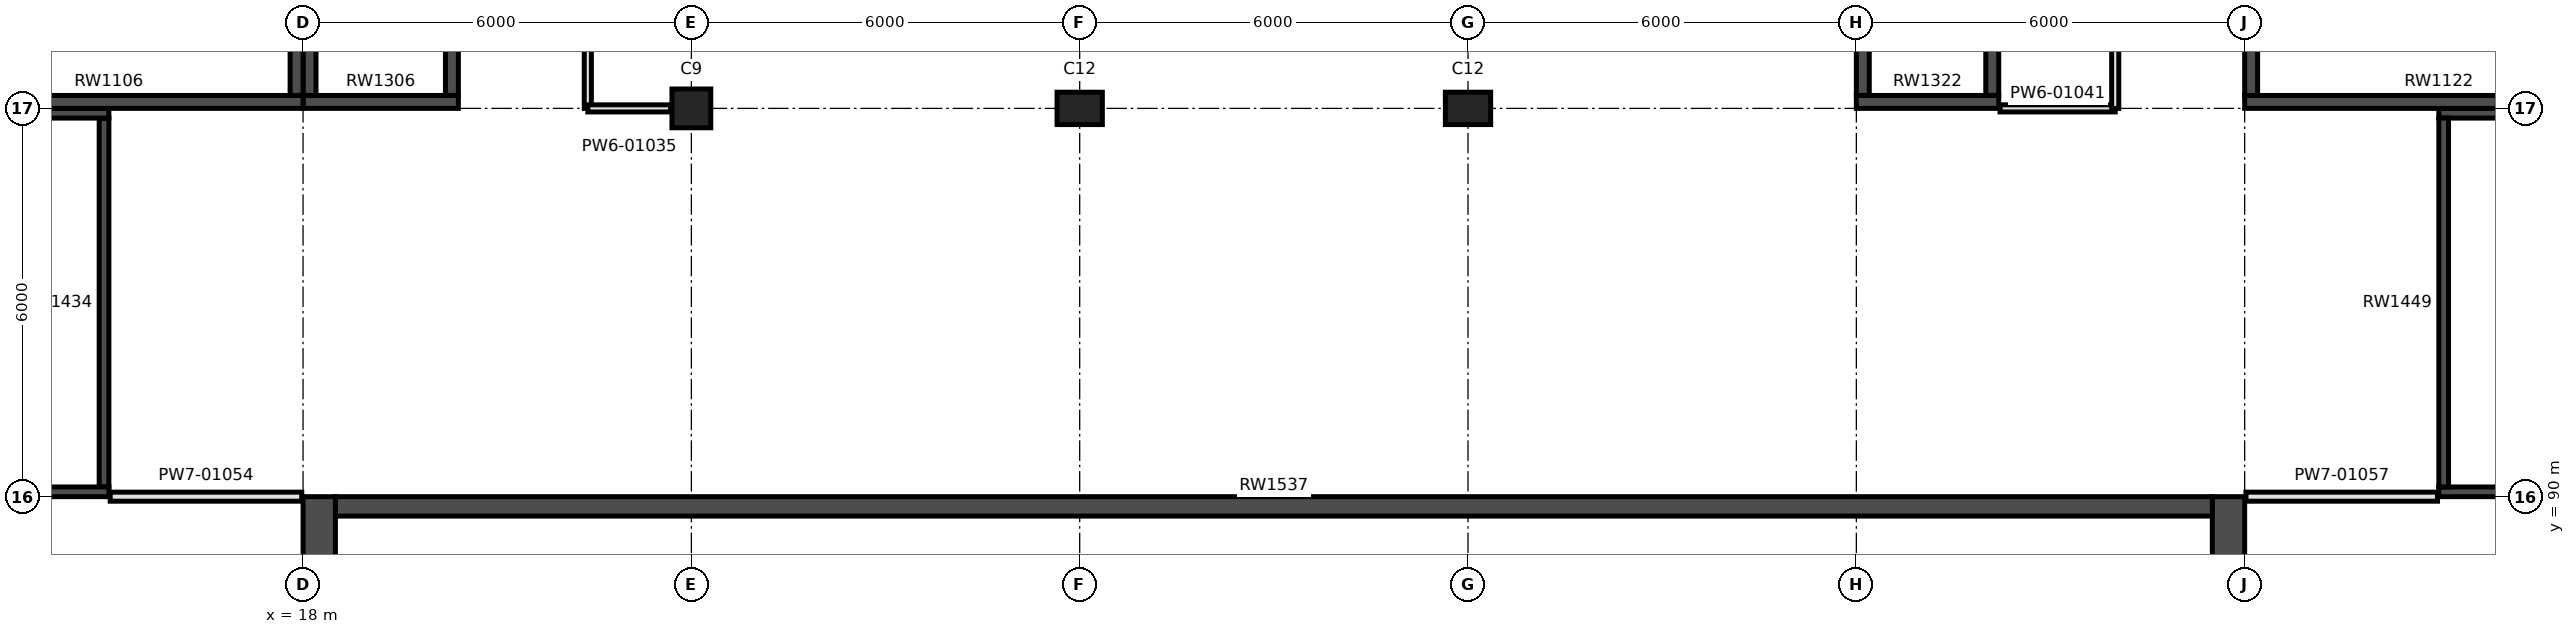
"""IFC4 building model, lengths in metres.
Left out: names, types, materials, properties, quantities, classifications, styles, units other than length and angle.
Written with IfcOpenShell. Run it as: python <this file> out.ifc"""

import sys

from ifc_helpers import new_model, si_unit, direction, frame, frame_2d, origin, origin_2d, place, context, subcontext, project, spatial, rectangle, extrude, element, fill, save


model = new_model("IFC4")
c1 = context("Model", 3, precision=1e-05, world=origin(), true_north=direction((0.0, 1.0)))
c2 = subcontext(c1, "Body", "Model", "MODEL_VIEW")
j1 = project(units=[si_unit("LENGTHUNIT", "METRE"), si_unit("PLANEANGLEUNIT", "RADIAN")], contexts=[c1])
p1 = place(None, origin())
s1 = spatial("IfcSite", under=j1, at=p1, CompositionType="ELEMENT")
p2 = place(p1, origin())
s2 = spatial("IfcBuilding", under=s1, at=p2, CompositionType="ELEMENT")
p3 = place(p2, frame((0.0, 0.0, 7.0)))
s3 = spatial("IfcBuildingStorey", under=s2, at=p3, CompositionType="ELEMENT", Elevation=7.0)
p4 = place(p3, frame((24.0, 96.0, 0.0), z_axis=(0.0, 0.0, 1.0), x_axis=(1.0, 0.0, 0.0)))
e1 = element("IfcColumn", 1, at=p4, inside=s3, PredefinedType="COLUMN", context=c2, shape_type="SweptSolid", body=[
    extrude(rectangle(XDim=0.6, YDim=0.6, at=origin_2d()), origin(), (0.0, 0.0, 1.0), 5.0),
])
for number, where, z_axis, x_axis in (
    (2, (30.0, 96.0, 0.0), (0.0, 0.0, 1.0), (1.0, 0.0, 0.0)),
    (3, (36.0, 96.0, 0.0), (0.0, 0.0, 1.0), (1.0, 0.0, 0.0)),
):
    element("IfcColumn", number, at=place(p3, frame(where, z_axis=z_axis, x_axis=x_axis)), inside=s3, PredefinedType="COLUMN", context=c2, shape_type="SweptSolid", body=[
        extrude(rectangle(XDim=0.7, YDim=0.5, at=origin_2d()), origin(), (0.0, 0.0, 1.0), 5.0),
    ])
p5 = place(p3, frame((12.0, 96.1, 0.0), z_axis=(0.0, 0.0, 1.0), x_axis=(1.0, 0.0, 0.0)))
e4 = element("IfcWall", 4, at=p5, inside=s3, PredefinedType="SHEAR", context=c2, shape_type="SweptSolid", body=[
    extrude(rectangle(XDim=6.0, YDim=0.2, at=frame_2d((3.0, 0.0))), origin(), (0.0, 0.0, 1.0), 5.0),
])
p6 = place(p3, frame((17.9, 96.2, 0.0), z_axis=(0.0, 0.0, 1.0), x_axis=(0.0, 1.0, 0.0)))
e5 = element("IfcWall", 5, at=p6, inside=s3, PredefinedType="SHEAR", context=c2, shape_type="SweptSolid", body=[
    extrude(rectangle(XDim=5.6, YDim=0.2, at=frame_2d((2.8, 0.0))), origin(), (0.0, 0.0, 1.0), 5.0),
])
p7 = place(p3, frame((48.0, 96.1, 0.0), z_axis=(0.0, 0.0, 1.0), x_axis=(1.0, 0.0, 0.0)))
e6 = element("IfcWall", 6, at=p7, inside=s3, PredefinedType="SHEAR", context=c2, shape_type="SweptSolid", body=[
    extrude(rectangle(XDim=6.0, YDim=0.2, at=frame_2d((3.0, 0.0))), origin(), (0.0, 0.0, 1.0), 5.0),
])
p8 = place(p3, frame((48.1, 96.2, 0.0), z_axis=(0.0, 0.0, 1.0), x_axis=(0.0, 1.0, 0.0)))
e7 = element("IfcWall", 7, at=p8, inside=s3, PredefinedType="SHEAR", context=c2, shape_type="SweptSolid", body=[
    extrude(rectangle(XDim=5.6, YDim=0.2, at=frame_2d((2.8, 0.0))), origin(), (0.0, 0.0, 1.0), 5.0),
])
p9 = place(p8, frame((4.4, 0.0, 0.0)))
e8 = element("IfcOpeningElement", 8, at=p9, cuts=e7, PredefinedType="OPENING", context=c2, shape_type="SweptSolid", body=[
    extrude(rectangle(XDim=1.1, YDim=2.2, at=frame_2d((0.55, 1.1))), frame((0.0, 0.11, 0.0), z_axis=(0.0, -1.0, 0.0), x_axis=(1.0, 0.0, 0.0)), (0.0, 0.0, 1.0), 0.22),
])
p10 = place(p3, frame((18.0, 96.1, 0.0), z_axis=(0.0, 0.0, 1.0), x_axis=(1.0, 0.0, 0.0)))
e9 = element("IfcWall", 9, at=p10, inside=s3, PredefinedType="SHEAR", context=c2, shape_type="SweptSolid", body=[
    extrude(rectangle(XDim=2.4, YDim=0.2, at=frame_2d((1.2, 0.0))), origin(), (0.0, 0.0, 1.0), 5.0),
])
for number, where, z_axis, x_axis in (
    (10, (18.1, 96.2, 0.0), (0.0, 0.0, 1.0), (0.0, 1.0, 0.0)),
    (11, (20.3, 96.2, 0.0), (0.0, 0.0, 1.0), (0.0, 1.0, 0.0)),
):
    element("IfcWall", number, at=place(p3, frame(where, z_axis=z_axis, x_axis=x_axis)), inside=s3, PredefinedType="SHEAR", context=c2, shape_type="SweptSolid", body=[
        extrude(rectangle(XDim=2.8, YDim=0.2, at=frame_2d((1.4, 0.0))), origin(), (0.0, 0.0, 1.0), 5.0),
    ])
p11 = place(p3, frame((42.0, 96.1, 0.0), z_axis=(0.0, 0.0, 1.0), x_axis=(1.0, 0.0, 0.0)))
e12 = element("IfcWall", 12, at=p11, inside=s3, PredefinedType="SHEAR", context=c2, shape_type="SweptSolid", body=[
    extrude(rectangle(XDim=2.2, YDim=0.2, at=frame_2d((1.1, 0.0))), origin(), (0.0, 0.0, 1.0), 5.0),
])
for number, where, z_axis, x_axis in (
    (13, (42.1, 96.2, 0.0), (0.0, 0.0, 1.0), (0.0, 1.0, 0.0)),
    (14, (44.1, 96.2, 0.0), (0.0, 0.0, 1.0), (0.0, 1.0, 0.0)),
):
    element("IfcWall", number, at=place(p3, frame(where, z_axis=z_axis, x_axis=x_axis)), inside=s3, PredefinedType="SHEAR", context=c2, shape_type="SweptSolid", body=[
        extrude(rectangle(XDim=2.0, YDim=0.2, at=frame_2d((1.0, 0.0))), origin(), (0.0, 0.0, 1.0), 5.0),
    ])
for number, where, z_axis, x_axis in (
    (15, (12.0, 95.925, 0.0), (0.0, 0.0, 1.0), (1.0, 0.0, 0.0)),
    (16, (12.0, 90.075, 0.0), (0.0, 0.0, 1.0), (1.0, 0.0, 0.0)),
):
    element("IfcWall", number, at=place(p3, frame(where, z_axis=z_axis, x_axis=x_axis)), inside=s3, PredefinedType="SHEAR", context=c2, shape_type="SweptSolid", body=[
        extrude(rectangle(XDim=3.0, YDim=0.15, at=frame_2d((1.5, 0.0))), origin(), (0.0, 0.0, 1.0), 5.0),
    ])
p12 = place(p3, frame((14.925, 90.15, 0.0), z_axis=(0.0, 0.0, 1.0), x_axis=(0.0, 1.0, 0.0)))
e17 = element("IfcWall", 17, at=p12, inside=s3, PredefinedType="SHEAR", context=c2, shape_type="SweptSolid", body=[
    extrude(rectangle(XDim=5.7, YDim=0.15, at=frame_2d((2.85, 0.0))), origin(), (0.0, 0.0, 1.0), 5.0),
])
for number, where, z_axis, x_axis in (
    (18, (51.0, 95.925, 0.0), (0.0, 0.0, 1.0), (1.0, 0.0, 0.0)),
    (19, (51.0, 90.075, 0.0), (0.0, 0.0, 1.0), (1.0, 0.0, 0.0)),
):
    element("IfcWall", number, at=place(p3, frame(where, z_axis=z_axis, x_axis=x_axis)), inside=s3, PredefinedType="SHEAR", context=c2, shape_type="SweptSolid", body=[
        extrude(rectangle(XDim=3.0, YDim=0.15, at=frame_2d((1.5, 0.0))), origin(), (0.0, 0.0, 1.0), 5.0),
    ])
p13 = place(p3, frame((51.075, 90.15, 0.0), z_axis=(0.0, 0.0, 1.0), x_axis=(0.0, 1.0, 0.0)))
e20 = element("IfcWall", 20, at=p13, inside=s3, PredefinedType="SHEAR", context=c2, shape_type="SweptSolid", body=[
    extrude(rectangle(XDim=5.7, YDim=0.15, at=frame_2d((2.85, 0.0))), origin(), (0.0, 0.0, 1.0), 5.0),
])
p14 = place(p3, frame((18.25, 54.5, 0.0), z_axis=(0.0, 0.0, 1.0), x_axis=(0.0, 1.0, 0.0)))
e21 = element("IfcWall", 21, at=p14, inside=s3, PredefinedType="SHEAR", context=c2, shape_type="SweptSolid", body=[
    extrude(rectangle(XDim=35.5, YDim=0.5, at=frame_2d((17.75, 0.0))), origin(), (0.0, 0.0, 1.0), 5.0),
])
p15 = place(p14, frame((18.2, 0.0, 0.0)))
e22 = element("IfcOpeningElement", 22, at=p15, cuts=e21, PredefinedType="OPENING", context=c2, shape_type="SweptSolid", body=[
    extrude(rectangle(XDim=1.8, YDim=2.4, at=frame_2d((0.9, 1.2))), frame((0.0, 0.26, 0.0), z_axis=(0.0, -1.0, 0.0), x_axis=(1.0, 0.0, 0.0)), (0.0, 0.0, 1.0), 0.52),
])
p16 = place(p14, frame((21.0, 0.0, 0.0)))
e23 = element("IfcOpeningElement", 23, at=p16, cuts=e21, PredefinedType="OPENING", context=c2, shape_type="SweptSolid", body=[
    extrude(rectangle(XDim=1.8, YDim=2.4, at=frame_2d((0.9, 1.2))), frame((0.0, 0.26, 0.0), z_axis=(0.0, -1.0, 0.0), x_axis=(1.0, 0.0, 0.0)), (0.0, 0.0, 1.0), 0.52),
])
p17 = place(p3, frame((47.75, 54.5, 0.0), z_axis=(0.0, 0.0, 1.0), x_axis=(0.0, 1.0, 0.0)))
e24 = element("IfcWall", 24, at=p17, inside=s3, PredefinedType="SHEAR", context=c2, shape_type="SweptSolid", body=[
    extrude(rectangle(XDim=35.5, YDim=0.5, at=frame_2d((17.75, 0.0))), origin(), (0.0, 0.0, 1.0), 5.0),
])
p18 = place(p17, frame((18.2, 0.0, 0.0)))
e25 = element("IfcOpeningElement", 25, at=p18, cuts=e24, PredefinedType="OPENING", context=c2, shape_type="SweptSolid", body=[
    extrude(rectangle(XDim=1.8, YDim=2.4, at=frame_2d((0.9, 1.2))), frame((0.0, 0.26, 0.0), z_axis=(0.0, -1.0, 0.0), x_axis=(1.0, 0.0, 0.0)), (0.0, 0.0, 1.0), 0.52),
])
p19 = place(p17, frame((21.0, 0.0, 0.0)))
e26 = element("IfcOpeningElement", 26, at=p19, cuts=e24, PredefinedType="OPENING", context=c2, shape_type="SweptSolid", body=[
    extrude(rectangle(XDim=1.8, YDim=2.4, at=frame_2d((0.9, 1.2))), frame((0.0, 0.26, 0.0), z_axis=(0.0, -1.0, 0.0), x_axis=(1.0, 0.0, 0.0)), (0.0, 0.0, 1.0), 0.52),
])
p20 = place(p3, frame((18.5, 89.85, 0.0), z_axis=(0.0, 0.0, 1.0), x_axis=(1.0, 0.0, 0.0)))
e27 = element("IfcWall", 27, at=p20, inside=s3, PredefinedType="SHEAR", context=c2, shape_type="SweptSolid", body=[
    extrude(rectangle(XDim=29.0, YDim=0.3, at=frame_2d((14.5, 0.0))), origin(), (0.0, 0.0, 1.0), 5.0),
])
p21 = place(p3, frame((22.4, 96.0, 0.0), z_axis=(0.0, 0.0, 1.0), x_axis=(0.0, 1.0, 0.0)))
e28 = element("IfcWall", 28, at=p21, inside=s3, PredefinedType="PARTITIONING", context=c2, shape_type="SweptSolid", body=[
    extrude(rectangle(XDim=3.2, YDim=0.11, at=frame_2d((1.6, 0.0))), origin(), (0.0, 0.0, 1.0), 4.15),
])
p22 = place(p21, frame((1.25, 0.0, 0.0)))
e29 = element("IfcOpeningElement", 29, at=p22, cuts=e28, PredefinedType="OPENING", context=c2, shape_type="SweptSolid", body=[
    extrude(rectangle(XDim=0.75, YDim=2.04, at=frame_2d((0.375, 1.02))), frame((0.0, 0.065, 0.0), z_axis=(0.0, -1.0, 0.0), x_axis=(1.0, 0.0, 0.0)), (0.0, 0.0, 1.0), 0.13),
])
p23 = place(p3, frame((22.4, 96.0, 0.0), z_axis=(0.0, 0.0, 1.0), x_axis=(1.0, 0.0, 0.0)))
e30 = element("IfcWall", 30, at=p23, inside=s3, PredefinedType="PARTITIONING", context=c2, shape_type="SweptSolid", body=[
    extrude(rectangle(XDim=1.28, YDim=0.11, at=frame_2d((0.64, 0.0))), origin(), (0.0, 0.0, 1.0), 4.15),
])
p24 = place(p3, frame((44.22, 96.0, 0.0), z_axis=(0.0, 0.0, 1.0), x_axis=(1.0, 0.0, 0.0)))
e31 = element("IfcWall", 31, at=p24, inside=s3, PredefinedType="PARTITIONING", context=c2, shape_type="SweptSolid", body=[
    extrude(rectangle(XDim=1.78, YDim=0.11, at=frame_2d((0.89, 0.0))), origin(), (0.0, 0.0, 1.0), 4.15),
])
p25 = place(p3, frame((46.0, 96.0, 0.0), z_axis=(0.0, 0.0, 1.0), x_axis=(0.0, 1.0, 0.0)))
e32 = element("IfcWall", 32, at=p25, inside=s3, PredefinedType="PARTITIONING", context=c2, shape_type="SweptSolid", body=[
    extrude(rectangle(XDim=2.4, YDim=0.11, at=frame_2d((1.2, 0.0))), origin(), (0.0, 0.0, 1.0), 4.15),
])
p26 = place(p25, frame((0.85, 0.0, 0.0)))
e33 = element("IfcOpeningElement", 33, at=p26, cuts=e32, PredefinedType="OPENING", context=c2, shape_type="SweptSolid", body=[
    extrude(rectangle(XDim=0.75, YDim=2.04, at=frame_2d((0.375, 1.02))), frame((0.0, 0.065, 0.0), z_axis=(0.0, -1.0, 0.0), x_axis=(1.0, 0.0, 0.0)), (0.0, 0.0, 1.0), 0.13),
])
p27 = place(p3, frame((15.02, 90.0, 0.0), z_axis=(0.0, 0.0, 1.0), x_axis=(1.0, 0.0, 0.0)))
e34 = element("IfcWall", 34, at=p27, inside=s3, PredefinedType="PARTITIONING", context=c2, shape_type="SweptSolid", body=[
    extrude(rectangle(XDim=2.96, YDim=0.14, at=frame_2d((1.48, 0.0))), origin(), (0.0, 0.0, 1.0), 4.15),
])
p28 = place(p27, frame((0.53, 0.0, 0.0)))
e35 = element("IfcOpeningElement", 35, at=p28, cuts=e34, PredefinedType="OPENING", context=c2, shape_type="SweptSolid", body=[
    extrude(rectangle(XDim=1.8, YDim=2.1, at=frame_2d((0.9, 1.05))), frame((0.0, 0.08, 0.0), z_axis=(0.0, -1.0, 0.0), x_axis=(1.0, 0.0, 0.0)), (0.0, 0.0, 1.0), 0.16),
])
p29 = place(p3, frame((48.02, 90.0, 0.0), z_axis=(0.0, 0.0, 1.0), x_axis=(1.0, 0.0, 0.0)))
e36 = element("IfcWall", 36, at=p29, inside=s3, PredefinedType="PARTITIONING", context=c2, shape_type="SweptSolid", body=[
    extrude(rectangle(XDim=2.96, YDim=0.14, at=frame_2d((1.48, 0.0))), origin(), (0.0, 0.0, 1.0), 4.15),
])
p30 = place(p29, frame((0.53, 0.0, 0.0)))
e37 = element("IfcOpeningElement", 37, at=p30, cuts=e36, PredefinedType="OPENING", context=c2, shape_type="SweptSolid", body=[
    extrude(rectangle(XDim=1.8, YDim=2.1, at=frame_2d((0.9, 1.05))), frame((0.0, 0.08, 0.0), z_axis=(0.0, -1.0, 0.0), x_axis=(1.0, 0.0, 0.0)), (0.0, 0.0, 1.0), 0.16),
])
p31 = place(p26, origin())
e38 = element("IfcDoor", 38, at=p31, inside=s3, OperationType="SINGLE_SWING_LEFT", PredefinedType="DOOR", context=c2, shape_type="SweptSolid", body=[
    extrude(rectangle(XDim=0.75, YDim=2.04, at=frame_2d((0.375, 1.02))), frame((0.0, 0.025, 0.0), z_axis=(0.0, -1.0, 0.0), x_axis=(1.0, 0.0, 0.0)), (0.0, 0.0, 1.0), 0.05),
])
fill(e33, e38)
p32 = place(p28, frame((1.8, 0.0, 0.0), z_axis=(0.0, 0.0, 1.0), x_axis=(-1.0, 0.0, 0.0)))
e39 = element("IfcDoor", 39, at=p32, inside=s3, OperationType="DOUBLE_DOOR_SINGLE_SWING", PredefinedType="DOOR", context=c2, shape_type="SweptSolid", body=[
    extrude(rectangle(XDim=1.8, YDim=2.1, at=frame_2d((0.9, 1.05))), frame((0.0, 0.025, 0.0), z_axis=(0.0, -1.0, 0.0), x_axis=(1.0, 0.0, 0.0)), (0.0, 0.0, 1.0), 0.05),
])
fill(e35, e39)
p33 = place(p30, frame((1.8, 0.0, 0.0), z_axis=(0.0, 0.0, 1.0), x_axis=(-1.0, 0.0, 0.0)))
e40 = element("IfcDoor", 40, at=p33, inside=s3, OperationType="DOUBLE_DOOR_SINGLE_SWING", PredefinedType="DOOR", context=c2, shape_type="SweptSolid", body=[
    extrude(rectangle(XDim=1.8, YDim=2.1, at=frame_2d((0.9, 1.05))), frame((0.0, 0.025, 0.0), z_axis=(0.0, -1.0, 0.0), x_axis=(1.0, 0.0, 0.0)), (0.0, 0.0, 1.0), 0.05),
])
fill(e37, e40)
save(model, sys.argv[1])
